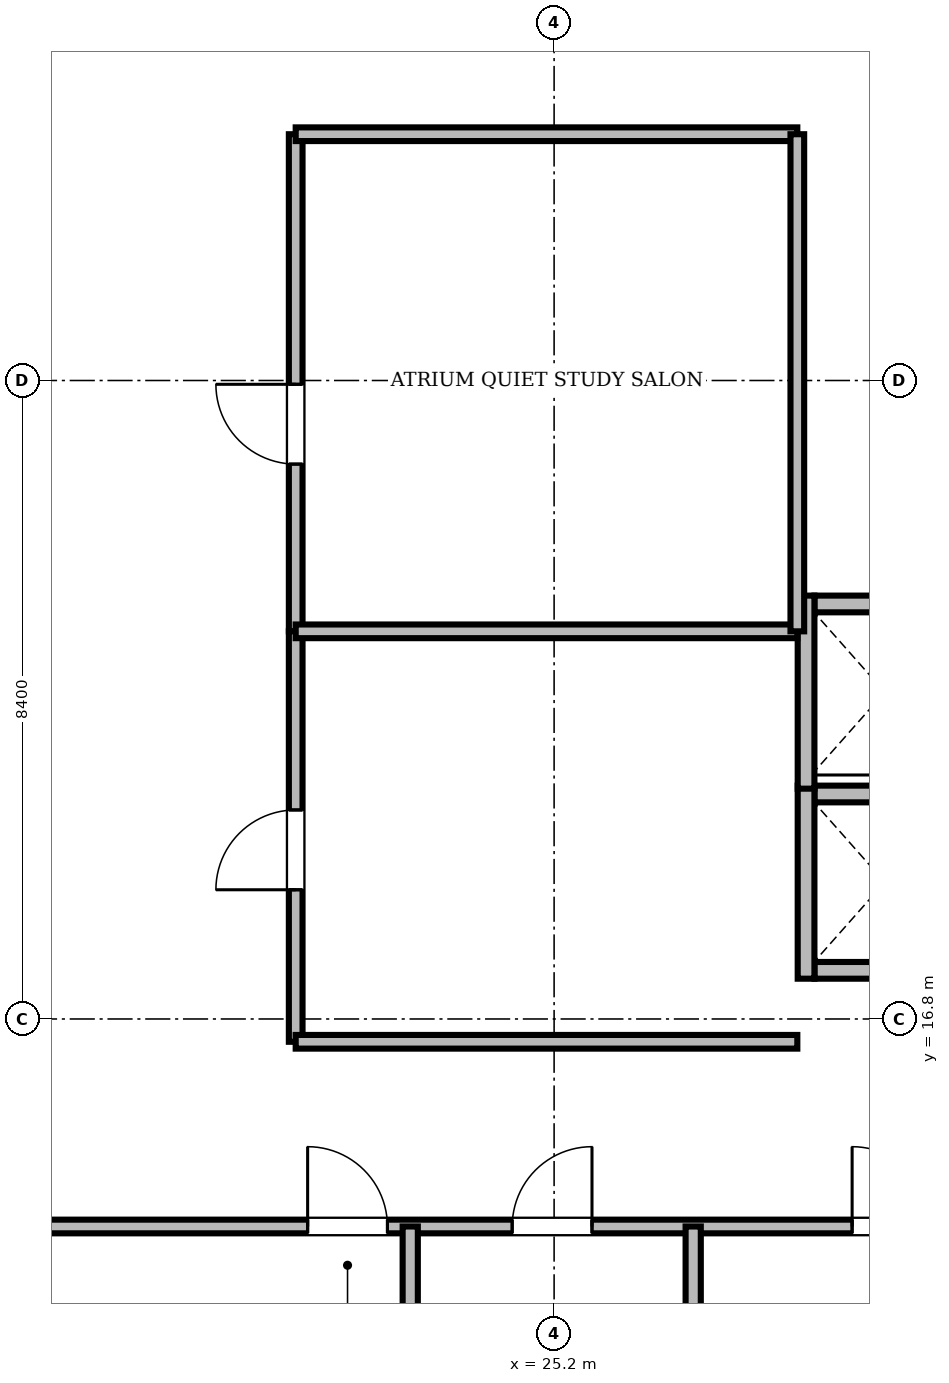
"""IFC4 building model, lengths in metres.
Left out: names, types, materials, properties, quantities, classifications, styles, units other than length and angle.
Written with IfcOpenShell. Run it as: python <this file> out.ifc"""

import sys

from ifc_helpers import new_model, si_unit, direction, frame, frame_2d, origin, origin_2d, place, context, subcontext, project, spatial, rectangle, extrude, source, transform, mapped, element, fill, save


model = new_model("IFC4")
c1 = context("Model", 3, precision=1e-05, world=origin(), true_north=direction((0.0, 1.0)))
c2 = subcontext(c1, "Body", "Model", "MODEL_VIEW")
j1 = project(units=[si_unit("LENGTHUNIT", "METRE"), si_unit("PLANEANGLEUNIT", "RADIAN")], contexts=[c1])
p1 = place(None, origin())
s1 = spatial("IfcSite", under=j1, at=p1, CompositionType="ELEMENT")
p2 = place(p1, origin())
s2 = spatial("IfcBuilding", under=s1, at=p2, CompositionType="ELEMENT")
p3 = place(p2, frame((0.0, 0.0, 262.45)))
s3 = spatial("IfcBuildingStorey", under=s2, at=p3, CompositionType="ELEMENT", Elevation=262.45)
m1 = source(origin(), c2, "Body", "SweptSolid", [
    extrude(rectangle(XDim=1.2, YDim=1.2, at=origin_2d()), origin(), (0.0, 0.0, 1.0), 3.704),
])
p4 = place(p3, frame((17.83, 14.508, 0.0), z_axis=(0.145795933552, 0.087464377858, 0.985440778721), x_axis=(-0.514438743924, 0.857527130037, 0.0)))
e1 = element("IfcColumn", 1, at=p4, inside=s3, PredefinedType="COLUMN", context=c2, shape_type="MappedRepresentation", body=[
    mapped(m1, transform((0.0, 0.0, 0.0), scale=1.0)),
])
m2 = source(origin(), c2, "Body", "SweptSolid", [
    extrude(rectangle(XDim=1.85, YDim=0.22, at=frame_2d((0.925, 0.0))), origin(), (0.0, 0.0, 1.0), 3.65),
])
for number, where, z_axis, x_axis in (
    (2, (28.625, 17.44, 0.0), (0.0, 0.0, 1.0), (1.0, 0.0, 0.0)),
    (3, (28.625, 19.76, 0.0), (0.0, 0.0, 1.0), (1.0, 0.0, 0.0)),
):
    element("IfcWall", number, at=place(p3, frame(where, z_axis=z_axis, x_axis=x_axis)), inside=s3, PredefinedType="SOLIDWALL", context=c2, shape_type="MappedRepresentation", body=[
        mapped(m2, transform((0.0, 0.0, 0.0), scale=1.0)),
    ])
m3 = source(origin(), c2, "Body", "SweptSolid", [
    extrude(rectangle(XDim=2.54, YDim=0.22, at=frame_2d((1.27, 0.0))), origin(), (0.0, 0.0, 1.0), 3.65),
])
p5 = place(p3, frame((28.515, 17.33, 0.0), z_axis=(0.0, 0.0, 1.0), x_axis=(0.0, 1.0, 0.0)))
e4 = element("IfcWall", 4, at=p5, inside=s3, PredefinedType="SOLIDWALL", context=c2, shape_type="MappedRepresentation", body=[
    mapped(m3, transform((0.0, 0.0, 0.0), scale=1.0)),
])
p6 = place(p3, frame((28.625, 22.26, 0.0), z_axis=(0.0, 0.0, 1.0), x_axis=(1.0, 0.0, 0.0)))
e5 = element("IfcWall", 5, at=p6, inside=s3, PredefinedType="SOLIDWALL", context=c2, shape_type="MappedRepresentation", body=[
    mapped(m2, transform((0.0, 0.0, 0.0), scale=1.0)),
])
p7 = place(p3, frame((28.515, 19.83, 0.0), z_axis=(0.0, 0.0, 1.0), x_axis=(0.0, 1.0, 0.0)))
e6 = element("IfcWall", 6, at=p7, inside=s3, PredefinedType="SOLIDWALL", context=c2, shape_type="MappedRepresentation", body=[
    mapped(m3, transform((0.0, 0.0, 0.0), scale=1.0)),
])
m4 = source(origin(), c2, "Body", "SweptSolid", [
    extrude(rectangle(XDim=43.996, YDim=0.18, at=frame_2d((21.998, 0.0))), origin(), (0.0, 0.0, 1.0), 2.892),
])
p8 = place(p3, frame((17.002, 14.07, 0.0), z_axis=(0.0, 0.0, 1.0), x_axis=(1.0, 0.0, 0.0)))
e7 = element("IfcWall", 7, at=p8, inside=s3, PredefinedType="PARTITIONING", context=c2, shape_type="MappedRepresentation", body=[
    mapped(m4, transform((0.0, 0.0, 0.0), scale=1.0)),
])
m5 = source(origin(), c2, "Body", "SweptSolid", [
    extrude(rectangle(XDim=1.05, YDim=2.2, at=frame_2d((0.525, 1.1))), frame((0.0, 0.1, 0.0), z_axis=(0.0, -1.0, 0.0), x_axis=(1.0, 0.0, 0.0)), (0.0, 0.0, 1.0), 0.2),
])
p9 = place(p8, frame((4.955, 0.0, 0.0)))
e8 = element("IfcOpeningElement", 8, at=p9, cuts=e7, PredefinedType="OPENING", context=c2, shape_type="MappedRepresentation", body=[
    mapped(m5, transform((0.0, 0.0, 0.0), scale=1.0)),
])
p10 = place(p8, frame((7.646, 0.0, 0.0)))
e9 = element("IfcOpeningElement", 9, at=p10, cuts=e7, PredefinedType="OPENING", context=c2, shape_type="MappedRepresentation", body=[
    mapped(m5, transform((0.0, 0.0, 0.0), scale=1.0)),
])
p11 = place(p8, frame((12.119, 0.0, 0.0)))
e10 = element("IfcOpeningElement", 10, at=p11, cuts=e7, PredefinedType="OPENING", context=c2, shape_type="MappedRepresentation", body=[
    mapped(m5, transform((0.0, 0.0, 0.0), scale=1.0)),
])
p12 = place(p8, frame((17.342, 0.0, 0.0)))
e11 = element("IfcOpeningElement", 11, at=p12, cuts=e7, PredefinedType="OPENING", context=c2, shape_type="MappedRepresentation", body=[
    mapped(m5, transform((0.0, 0.0, 0.0), scale=1.0)),
])
p13 = place(p8, frame((22.564, 0.0, 0.0)))
e12 = element("IfcOpeningElement", 12, at=p13, cuts=e7, PredefinedType="OPENING", context=c2, shape_type="MappedRepresentation", body=[
    mapped(m5, transform((0.0, 0.0, 0.0), scale=1.0)),
])
p14 = place(p8, frame((28.537, 0.0, 0.0)))
e13 = element("IfcOpeningElement", 13, at=p14, cuts=e7, PredefinedType="OPENING", context=c2, shape_type="MappedRepresentation", body=[
    mapped(m5, transform((0.0, 0.0, 0.0), scale=1.0)),
])
p15 = place(p8, frame((33.518, 0.0, 0.0)))
e14 = element("IfcOpeningElement", 14, at=p15, cuts=e7, PredefinedType="OPENING", context=c2, shape_type="MappedRepresentation", body=[
    mapped(m5, transform((0.0, 0.0, 0.0), scale=1.0)),
])
m6 = source(origin(), c2, "Body", "SweptSolid", [
    extrude(rectangle(XDim=6.54, YDim=0.18, at=frame_2d((3.27, 0.0))), origin(), (0.0, 0.0, 1.0), 3.092),
])
p16 = place(p3, frame((21.8, 21.9, 0.0), z_axis=(0.0, 0.0, 1.0), x_axis=(0.0, 1.0, 0.0)))
e15 = element("IfcWall", 15, at=p16, inside=s3, PredefinedType="PARTITIONING", context=c2, shape_type="MappedRepresentation", body=[
    mapped(m6, transform((0.0, 0.0, 0.0), scale=1.0)),
])
p17 = place(p16, frame((2.2, 0.0, 0.0)))
e16 = element("IfcOpeningElement", 16, at=p17, cuts=e15, PredefinedType="OPENING", context=c2, shape_type="MappedRepresentation", body=[
    mapped(m5, transform((0.0, 0.0, 0.0), scale=1.0)),
])
m7 = source(origin(), c2, "Body", "SweptSolid", [
    extrude(rectangle(XDim=5.4, YDim=0.18, at=frame_2d((2.7, 0.0))), origin(), (0.0, 0.0, 1.0), 3.65),
])
p18 = place(p3, frame((21.8, 16.5, 0.0), z_axis=(0.0, 0.0, 1.0), x_axis=(0.0, 1.0, 0.0)))
e17 = element("IfcWall", 17, at=p18, inside=s3, PredefinedType="PARTITIONING", context=c2, shape_type="MappedRepresentation", body=[
    mapped(m7, transform((0.0, 0.0, 0.0), scale=1.0)),
])
p19 = place(p18, frame((2.0, 0.0, 0.0)))
e18 = element("IfcOpeningElement", 18, at=p19, cuts=e17, PredefinedType="OPENING", context=c2, shape_type="MappedRepresentation", body=[
    mapped(m5, transform((0.0, 0.0, 0.0), scale=1.0)),
])
m8 = source(origin(), c2, "Body", "SweptSolid", [
    extrude(rectangle(XDim=10.868, YDim=0.2, at=frame_2d((5.434, 0.0))), origin(), (0.0, 0.0, 1.0), 2.892),
])
for number, where, z_axis, x_axis in (
    (19, (23.307, 3.202, 0.0), (0.0, 0.0, 1.0), (0.0, 1.0, 0.0)),
    (20, (27.03, 3.202, 0.0), (0.0, 0.0, 1.0), (0.0, 1.0, 0.0)),
):
    element("IfcWall", number, at=place(p3, frame(where, z_axis=z_axis, x_axis=x_axis)), inside=s3, PredefinedType="PARTITIONING", context=c2, shape_type="MappedRepresentation", body=[
        mapped(m8, transform((0.0, 0.0, 0.0), scale=1.0)),
    ])
m9 = source(origin(), c2, "Body", "SweptSolid", [
    extrude(rectangle(XDim=6.6, YDim=0.18, at=frame_2d((3.3, 0.0))), origin(), (0.0, 0.0, 1.0), 3.65),
])
for number, where, z_axis, x_axis in (
    (21, (21.8, 16.5, 0.0), (0.0, 0.0, 1.0), (1.0, 0.0, 0.0)),
    (22, (21.8, 21.9, 0.0), (0.0, 0.0, 1.0), (1.0, 0.0, 0.0)),
):
    element("IfcWall", number, at=place(p3, frame(where, z_axis=z_axis, x_axis=x_axis)), inside=s3, PredefinedType="PARTITIONING", context=c2, shape_type="MappedRepresentation", body=[
        mapped(m9, transform((0.0, 0.0, 0.0), scale=1.0)),
    ])
m10 = source(origin(), c2, "Body", "SweptSolid", [
    extrude(rectangle(XDim=6.6, YDim=0.18, at=frame_2d((3.3, 0.0))), origin(), (0.0, 0.0, 1.0), 3.092),
])
p20 = place(p3, frame((21.8, 28.44, 0.0), z_axis=(0.0, 0.0, 1.0), x_axis=(1.0, 0.0, 0.0)))
e23 = element("IfcWall", 23, at=p20, inside=s3, PredefinedType="PARTITIONING", context=c2, shape_type="MappedRepresentation", body=[
    mapped(m10, transform((0.0, 0.0, 0.0), scale=1.0)),
])
p21 = place(p3, frame((28.4, 21.9, 0.0), z_axis=(0.0, 0.0, 1.0), x_axis=(0.0, 1.0, 0.0)))
e24 = element("IfcWall", 24, at=p21, inside=s3, PredefinedType="PARTITIONING", context=c2, shape_type="MappedRepresentation", body=[
    mapped(m6, transform((0.0, 0.0, 0.0), scale=1.0)),
])
m11 = source(origin(), c2, "Body", "SweptSolid", [
    extrude(rectangle(XDim=1.05, YDim=2.2, at=frame_2d((0.525, 1.1))), frame((0.0, 0.025, 0.0), z_axis=(0.0, -1.0, 0.0), x_axis=(1.0, 0.0, 0.0)), (0.0, 0.0, 1.0), 0.05),
])
p22 = place(p9, origin())
e25 = element("IfcDoor", 25, at=p22, inside=s3, OperationType="SINGLE_SWING_LEFT", PredefinedType="DOOR", context=c2, shape_type="MappedRepresentation", body=[
    mapped(m11, transform((0.0, 0.0, 0.0), scale=1.0)),
])
fill(e8, e25)
p23 = place(p10, origin())
e26 = element("IfcDoor", 26, at=p23, inside=s3, OperationType="SINGLE_SWING_RIGHT", PredefinedType="DOOR", context=c2, shape_type="MappedRepresentation", body=[
    mapped(m11, transform((0.0, 0.0, 0.0), scale=1.0)),
])
fill(e9, e26)
p24 = place(p11, origin())
e27 = element("IfcDoor", 27, at=p24, inside=s3, OperationType="SINGLE_SWING_LEFT", PredefinedType="DOOR", context=c2, shape_type="MappedRepresentation", body=[
    mapped(m11, transform((0.0, 0.0, 0.0), scale=1.0)),
])
fill(e10, e27)
p25 = place(p17, origin())
e28 = element("IfcDoor", 28, at=p25, inside=s3, OperationType="SINGLE_SWING_RIGHT", PredefinedType="DOOR", context=c2, shape_type="MappedRepresentation", body=[
    mapped(m11, transform((0.0, 0.0, 0.0), scale=1.0)),
])
fill(e16, e28)
p26 = place(p19, origin())
e29 = element("IfcDoor", 29, at=p26, inside=s3, OperationType="SINGLE_SWING_LEFT", PredefinedType="DOOR", context=c2, shape_type="MappedRepresentation", body=[
    mapped(m11, transform((0.0, 0.0, 0.0), scale=1.0)),
])
fill(e18, e29)
save(model, sys.argv[1])
